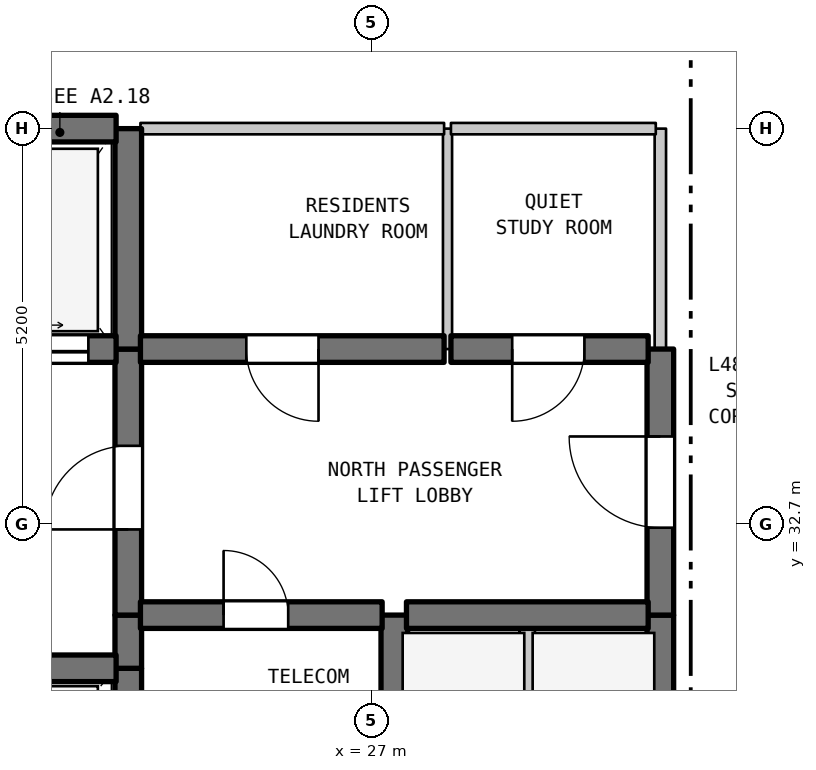
"""IFC4 building model, lengths in metres.
Left out: names, types, materials, properties, quantities, classifications, styles, units other than length and angle.
Written with IfcOpenShell. Run it as: python <this file> out.ifc"""

import sys

from ifc_helpers import new_model, si_unit, direction, frame, frame_2d, origin, place, context, subcontext, project, spatial, rectangle, extrude, element, fill, save


model = new_model("IFC4")
c1 = context("Model", 3, precision=1e-05, world=origin(), true_north=direction((0.0, 1.0)))
c2 = subcontext(c1, "Body", "Model", "MODEL_VIEW")
j1 = project(units=[si_unit("LENGTHUNIT", "METRE"), si_unit("PLANEANGLEUNIT", "RADIAN")], contexts=[c1])
p1 = place(None, origin())
s1 = spatial("IfcSite", under=j1, at=p1, CompositionType="ELEMENT")
p2 = place(p1, origin())
s2 = spatial("IfcBuilding", under=s1, at=p2, CompositionType="ELEMENT")
p3 = place(p2, frame((0.0, 0.0, 195.8)))
s3 = spatial("IfcBuildingStorey", under=s2, at=p3, CompositionType="ELEMENT", Elevation=195.8)
p4 = place(p3, frame((23.8, 29.5, 0.0), z_axis=(0.0, 0.0, 1.0), x_axis=(0.0, 1.0, 0.0)))
e1 = element("IfcWall", 1, at=p4, inside=s3, PredefinedType="SHEAR", context=c2, shape_type="SweptSolid", body=[
    extrude(rectangle(XDim=1.3, YDim=0.35, at=frame_2d((0.65, 0.0))), origin(), (0.0, 0.0, 1.0), 3.39),
])
p5 = place(p3, frame((23.8, 30.8, 0.0), z_axis=(0.0, 0.0, 1.0), x_axis=(0.0, 1.0, 0.0)))
e2 = element("IfcWall", 2, at=p5, inside=s3, PredefinedType="SHEAR", context=c2, shape_type="SweptSolid", body=[
    extrude(rectangle(XDim=0.7, YDim=0.35, at=frame_2d((0.35, 0.0))), origin(), (0.0, 0.0, 1.0), 3.39),
])
p6 = place(p3, frame((23.8, 31.5, 0.0), z_axis=(0.0, 0.0, 1.0), x_axis=(0.0, 1.0, 0.0)))
e3 = element("IfcWall", 3, at=p6, inside=s3, PredefinedType="SHEAR", context=c2, shape_type="SweptSolid", body=[
    extrude(rectangle(XDim=3.5, YDim=0.35, at=frame_2d((1.75, 0.0))), origin(), (0.0, 0.0, 1.0), 3.39),
])
p7 = place(p6, frame((1.127, 0.0, 0.0)))
e4 = element("IfcOpeningElement", 4, at=p7, cuts=e3, PredefinedType="OPENING", context=c2, shape_type="SweptSolid", body=[
    extrude(rectangle(XDim=1.1, YDim=2.15, at=frame_2d((0.55, 1.075))), frame((0.0, 0.185, 0.0), z_axis=(0.0, -1.0, 0.0), x_axis=(1.0, 0.0, 0.0)), (0.0, 0.0, 1.0), 0.37),
])
p8 = place(p3, frame((23.8, 35.0, 0.0), z_axis=(0.0, 0.0, 1.0), x_axis=(0.0, 1.0, 0.0)))
e5 = element("IfcWall", 5, at=p8, inside=s3, PredefinedType="SHEAR", context=c2, shape_type="SweptSolid", body=[
    extrude(rectangle(XDim=2.9, YDim=0.35, at=frame_2d((1.45, 0.0))), origin(), (0.0, 0.0, 1.0), 3.39),
])
p9 = place(p3, frame((27.3, 29.5, 0.0), z_axis=(0.0, 0.0, 1.0), x_axis=(0.0, 1.0, 0.0)))
e6 = element("IfcWall", 6, at=p9, inside=s3, PredefinedType="SHEAR", context=c2, shape_type="SweptSolid", body=[
    extrude(rectangle(XDim=2.0, YDim=0.35, at=frame_2d((1.0, 0.0))), origin(), (0.0, 0.0, 1.0), 3.39),
])
p10 = place(p3, frame((28.0, 35.0, 0.0), z_axis=(0.0, 0.0, 1.0), x_axis=(0.0, 1.0, 0.0)))
e7 = element("IfcWall", 7, at=p10, inside=s3, PredefinedType="PARTITIONING", context=c2, shape_type="SweptSolid", body=[
    extrude(rectangle(XDim=2.9, YDim=0.12, at=frame_2d((1.45, 0.0))), origin(), (0.0, 0.0, 1.0), 3.39),
])
p11 = place(p3, frame((29.05, 28.9, 0.0), z_axis=(0.0, 0.0, 1.0), x_axis=(0.0, 1.0, 0.0)))
e8 = element("IfcWall", 8, at=p11, inside=s3, PredefinedType="STANDARD", context=c2, shape_type="SweptSolid", body=[
    extrude(rectangle(XDim=2.6, YDim=0.2, at=frame_2d((1.3, 0.0))), origin(), (0.0, 0.0, 1.0), 3.39),
])
p12 = place(p3, frame((30.8, 28.9, 0.0), z_axis=(0.0, 0.0, 1.0), x_axis=(0.0, 1.0, 0.0)))
e9 = element("IfcWall", 9, at=p12, inside=s3, PredefinedType="SHEAR", context=c2, shape_type="SweptSolid", body=[
    extrude(rectangle(XDim=2.6, YDim=0.35, at=frame_2d((1.3, 0.0))), origin(), (0.0, 0.0, 1.0), 3.39),
])
p13 = place(p3, frame((30.8, 31.5, 0.0), z_axis=(0.0, 0.0, 1.0), x_axis=(0.0, 1.0, 0.0)))
e10 = element("IfcWall", 10, at=p13, inside=s3, PredefinedType="SHEAR", context=c2, shape_type="SweptSolid", body=[
    extrude(rectangle(XDim=3.5, YDim=0.35, at=frame_2d((1.75, 0.0))), origin(), (0.0, 0.0, 1.0), 3.39),
])
p14 = place(p13, frame((1.15, 0.0, 0.0)))
e11 = element("IfcOpeningElement", 11, at=p14, cuts=e10, PredefinedType="OPENING", context=c2, shape_type="SweptSolid", body=[
    extrude(rectangle(XDim=1.2, YDim=2.2, at=frame_2d((0.6, 1.1))), frame((0.0, 0.185, 0.0), z_axis=(0.0, -1.0, 0.0), x_axis=(1.0, 0.0, 0.0)), (0.0, 0.0, 1.0), 0.37),
])
p15 = place(p3, frame((30.8, 35.0, 0.0), z_axis=(0.0, 0.0, 1.0), x_axis=(0.0, 1.0, 0.0)))
e12 = element("IfcWall", 12, at=p15, inside=s3, PredefinedType="STANDARD", context=c2, shape_type="SweptSolid", body=[
    extrude(rectangle(XDim=2.9, YDim=0.15, at=frame_2d((1.45, 0.0))), origin(), (0.0, 0.0, 1.0), 3.39),
])
p16 = place(p3, frame((19.16, 30.8, 0.0), z_axis=(0.0, 0.0, 1.0), x_axis=(1.0, 0.0, 0.0)))
e13 = element("IfcWall", 13, at=p16, inside=s3, PredefinedType="SHEAR", context=c2, shape_type="SweptSolid", body=[
    extrude(rectangle(XDim=4.48, YDim=0.35, at=frame_2d((2.24, 0.0))), origin(), (0.0, 0.0, 1.0), 3.39),
])
p17 = place(p3, frame((23.96, 31.5, 0.0), z_axis=(0.0, 0.0, 1.0), x_axis=(1.0, 0.0, 0.0)))
e14 = element("IfcWall", 14, at=p17, inside=s3, PredefinedType="SHEAR", context=c2, shape_type="SweptSolid", body=[
    extrude(rectangle(XDim=3.18, YDim=0.35, at=frame_2d((1.59, 0.0))), origin(), (0.0, 0.0, 1.0), 3.39),
])
p18 = place(p17, frame((1.094, 0.0, 0.0)))
e15 = element("IfcOpeningElement", 15, at=p18, cuts=e14, PredefinedType="OPENING", context=c2, shape_type="SweptSolid", body=[
    extrude(rectangle(XDim=0.85, YDim=2.1, at=frame_2d((0.425, 1.05))), frame((0.0, 0.185, 0.0), z_axis=(0.0, -1.0, 0.0), x_axis=(1.0, 0.0, 0.0)), (0.0, 0.0, 1.0), 0.37),
])
p19 = place(p3, frame((27.46, 31.5, 0.0), z_axis=(0.0, 0.0, 1.0), x_axis=(1.0, 0.0, 0.0)))
e16 = element("IfcWall", 16, at=p19, inside=s3, PredefinedType="SHEAR", context=c2, shape_type="SweptSolid", body=[
    extrude(rectangle(XDim=3.18, YDim=0.35, at=frame_2d((1.59, 0.0))), origin(), (0.0, 0.0, 1.0), 3.39),
])
p20 = place(p3, frame((19.16, 35.0, 0.0), z_axis=(0.0, 0.0, 1.0), x_axis=(1.0, 0.0, 0.0)))
e17 = element("IfcWall", 17, at=p20, inside=s3, PredefinedType="SHEAR", context=c2, shape_type="SweptSolid", body=[
    extrude(rectangle(XDim=4.48, YDim=0.35, at=frame_2d((2.24, 0.0))), origin(), (0.0, 0.0, 1.0), 3.39),
])
p21 = place(p20, frame((0.365, 0.0, 0.0)))
e18 = element("IfcOpeningElement", 18, at=p21, cuts=e17, PredefinedType="OPENING", context=c2, shape_type="SweptSolid", body=[
    extrude(rectangle(XDim=1.35, YDim=2.2, at=frame_2d((0.675, 1.1))), frame((0.0, 0.185, 0.0), z_axis=(0.0, -1.0, 0.0), x_axis=(1.0, 0.0, 0.0)), (0.0, 0.0, 1.0), 0.37),
])
p22 = place(p20, frame((2.765, 0.0, 0.0)))
e19 = element("IfcOpeningElement", 19, at=p22, cuts=e17, PredefinedType="OPENING", context=c2, shape_type="SweptSolid", body=[
    extrude(rectangle(XDim=1.35, YDim=2.2, at=frame_2d((0.675, 1.1))), frame((0.0, 0.185, 0.0), z_axis=(0.0, -1.0, 0.0), x_axis=(1.0, 0.0, 0.0)), (0.0, 0.0, 1.0), 0.37),
])
p23 = place(p3, frame((23.96, 35.0, 0.0), z_axis=(0.0, 0.0, 1.0), x_axis=(1.0, 0.0, 0.0)))
e20 = element("IfcWall", 20, at=p23, inside=s3, PredefinedType="SHEAR", context=c2, shape_type="SweptSolid", body=[
    extrude(rectangle(XDim=3.995, YDim=0.35, at=frame_2d((1.998, 0.0))), origin(), (0.0, 0.0, 1.0), 3.39),
])
p24 = place(p23, frame((1.393, 0.0, 0.0)))
e21 = element("IfcOpeningElement", 21, at=p24, cuts=e20, PredefinedType="OPENING", context=c2, shape_type="SweptSolid", body=[
    extrude(rectangle(XDim=0.95, YDim=2.15, at=frame_2d((0.475, 1.075))), frame((0.0, 0.185, 0.0), z_axis=(0.0, -1.0, 0.0), x_axis=(1.0, 0.0, 0.0)), (0.0, 0.0, 1.0), 0.37),
])
p25 = place(p3, frame((28.045, 35.0, 0.0), z_axis=(0.0, 0.0, 1.0), x_axis=(1.0, 0.0, 0.0)))
e22 = element("IfcWall", 22, at=p25, inside=s3, PredefinedType="SHEAR", context=c2, shape_type="SweptSolid", body=[
    extrude(rectangle(XDim=2.595, YDim=0.35, at=frame_2d((1.297, 0.0))), origin(), (0.0, 0.0, 1.0), 3.39),
])
p26 = place(p25, frame((0.806, 0.0, 0.0)))
e23 = element("IfcOpeningElement", 23, at=p26, cuts=e22, PredefinedType="OPENING", context=c2, shape_type="SweptSolid", body=[
    extrude(rectangle(XDim=0.95, YDim=2.15, at=frame_2d((0.475, 1.075))), frame((0.0, 0.185, 0.0), z_axis=(0.0, -1.0, 0.0), x_axis=(1.0, 0.0, 0.0)), (0.0, 0.0, 1.0), 0.37),
])
p27 = place(p3, frame((19.16, 37.9, 0.0), z_axis=(0.0, 0.0, 1.0), x_axis=(1.0, 0.0, 0.0)))
e24 = element("IfcWall", 24, at=p27, inside=s3, PredefinedType="SHEAR", context=c2, shape_type="SweptSolid", body=[
    extrude(rectangle(XDim=4.48, YDim=0.35, at=frame_2d((2.24, 0.0))), origin(), (0.0, 0.0, 1.0), 3.39),
])
p28 = place(p3, frame((23.96, 37.9, 0.0), z_axis=(0.0, 0.0, 1.0), x_axis=(1.0, 0.0, 0.0)))
e25 = element("IfcWall", 25, at=p28, inside=s3, PredefinedType="STANDARD", context=c2, shape_type="SweptSolid", body=[
    extrude(rectangle(XDim=3.995, YDim=0.15, at=frame_2d((1.998, 0.0))), origin(), (0.0, 0.0, 1.0), 2.89),
])
p29 = place(p3, frame((28.045, 37.9, 0.0), z_axis=(0.0, 0.0, 1.0), x_axis=(1.0, 0.0, 0.0)))
e26 = element("IfcWall", 26, at=p29, inside=s3, PredefinedType="STANDARD", context=c2, shape_type="SweptSolid", body=[
    extrude(rectangle(XDim=2.695, YDim=0.15, at=frame_2d((1.348, 0.0))), origin(), (0.0, 0.0, 1.0), 2.89),
])
p30 = place(p7, origin())
e27 = element("IfcDoor", 27, at=p30, inside=s3, OperationType="SINGLE_SWING_LEFT", PredefinedType="DOOR", context=c2, shape_type="SweptSolid", body=[
    extrude(rectangle(XDim=1.1, YDim=2.15, at=frame_2d((0.55, 1.075))), frame((0.0, 0.025, 0.0), z_axis=(0.0, -1.0, 0.0), x_axis=(1.0, 0.0, 0.0)), (0.0, 0.0, 1.0), 0.05),
])
fill(e4, e27)
p31 = place(p14, origin())
e28 = element("IfcDoor", 28, at=p31, inside=s3, OperationType="SINGLE_SWING_RIGHT", PredefinedType="DOOR", context=c2, shape_type="SweptSolid", body=[
    extrude(rectangle(XDim=1.2, YDim=2.2, at=frame_2d((0.6, 1.1))), frame((0.0, 0.025, 0.0), z_axis=(0.0, -1.0, 0.0), x_axis=(1.0, 0.0, 0.0)), (0.0, 0.0, 1.0), 0.05),
])
fill(e11, e28)
p32 = place(p18, origin())
e29 = element("IfcDoor", 29, at=p32, inside=s3, OperationType="SINGLE_SWING_LEFT", PredefinedType="DOOR", context=c2, shape_type="SweptSolid", body=[
    extrude(rectangle(XDim=0.85, YDim=2.1, at=frame_2d((0.425, 1.05))), frame((0.0, 0.025, 0.0), z_axis=(0.0, -1.0, 0.0), x_axis=(1.0, 0.0, 0.0)), (0.0, 0.0, 1.0), 0.05),
])
fill(e15, e29)
p33 = place(p22, origin())
e30 = element("IfcDoor", 30, at=p33, inside=s3, OperationType="DOUBLE_DOOR_SLIDING", PredefinedType="DOOR", context=c2, shape_type="SweptSolid", body=[
    extrude(rectangle(XDim=1.35, YDim=2.2, at=frame_2d((0.675, 1.1))), frame((0.0, 0.025, 0.0), z_axis=(0.0, -1.0, 0.0), x_axis=(1.0, 0.0, 0.0)), (0.0, 0.0, 1.0), 0.05),
])
fill(e19, e30)
p34 = place(p24, frame((0.95, 0.0, 0.0), z_axis=(0.0, 0.0, 1.0), x_axis=(-1.0, 0.0, 0.0)))
e31 = element("IfcDoor", 31, at=p34, inside=s3, OperationType="SINGLE_SWING_RIGHT", PredefinedType="DOOR", context=c2, shape_type="SweptSolid", body=[
    extrude(rectangle(XDim=0.95, YDim=2.15, at=frame_2d((0.475, 1.075))), frame((0.0, 0.025, 0.0), z_axis=(0.0, -1.0, 0.0), x_axis=(1.0, 0.0, 0.0)), (0.0, 0.0, 1.0), 0.05),
])
fill(e21, e31)
p35 = place(p26, frame((0.95, 0.0, 0.0), z_axis=(0.0, 0.0, 1.0), x_axis=(-1.0, 0.0, 0.0)))
e32 = element("IfcDoor", 32, at=p35, inside=s3, OperationType="SINGLE_SWING_LEFT", PredefinedType="DOOR", context=c2, shape_type="SweptSolid", body=[
    extrude(rectangle(XDim=0.95, YDim=2.15, at=frame_2d((0.475, 1.075))), frame((0.0, 0.025, 0.0), z_axis=(0.0, -1.0, 0.0), x_axis=(1.0, 0.0, 0.0)), (0.0, 0.0, 1.0), 0.05),
])
fill(e23, e32)
save(model, sys.argv[1])
